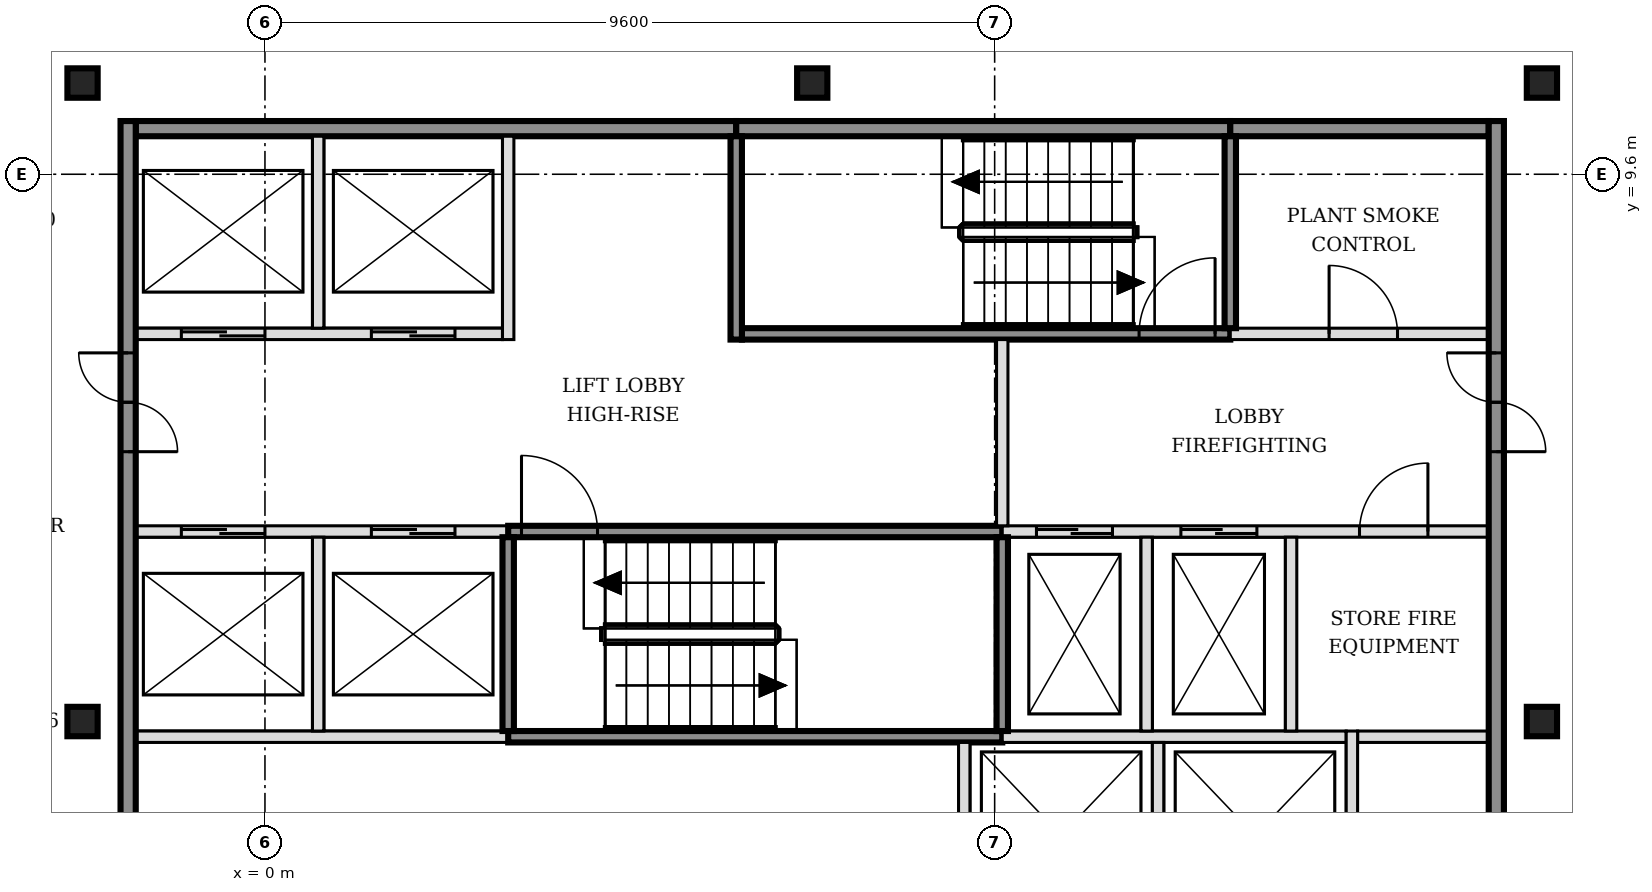
"""IFC4 building model, lengths in metres.
Left out: names, types, materials, properties, quantities, classifications, styles, units other than length and angle.
Written with IfcOpenShell. Run it as: python <this file> out.ifc"""

import sys

from ifc_helpers import new_model, si_unit, direction, frame, frame_2d, origin, origin_2d, place, context, subcontext, project, spatial, rectangle, i_section, extrude, element, fill, save


model = new_model("IFC4")
c1 = context("Model", 3, precision=1e-05, world=origin(), true_north=direction((0.0, 1.0)))
c2 = subcontext(c1, "Body", "Model", "MODEL_VIEW")
j1 = project(units=[si_unit("LENGTHUNIT", "METRE"), si_unit("PLANEANGLEUNIT", "RADIAN")], contexts=[c1])
p1 = place(None, origin())
s1 = spatial("IfcSite", under=j1, at=p1, CompositionType="ELEMENT")
p2 = place(p1, origin())
s2 = spatial("IfcBuilding", under=s1, at=p2, CompositionType="ELEMENT")
p3 = place(p2, frame((0.0, 0.0, 261.0)))
s3 = spatial("IfcBuildingStorey", under=s2, at=p3, CompositionType="ELEMENT", Elevation=261.0)
for number, where, z_axis, x_axis in (
    (1, (-2.4, 2.4, -0.25), (0.0, 0.0, 1.0), (1.0, 0.0, 0.0)),
    (2, (16.8, 2.4, -0.25), (0.0, 0.0, 1.0), (1.0, 0.0, 0.0)),
    (3, (-2.4, 10.8, -0.25), (0.0, 0.0, 1.0), (1.0, 0.0, 0.0)),
    (4, (7.2, 10.8, -0.25), (0.0, 0.0, 1.0), (1.0, 0.0, 0.0)),
    (5, (16.8, 10.8, -0.25), (0.0, 0.0, 1.0), (1.0, 0.0, 0.0)),
):
    element("IfcColumn", number, at=place(p3, frame(where, z_axis=z_axis, x_axis=x_axis)), inside=s3, PredefinedType="COLUMN", context=c2, shape_type="SweptSolid", body=[
        extrude(i_section(OverallWidth=0.398, OverallDepth=0.387, WebThickness=0.021, FlangeThickness=0.033, FilletRadius=0.015, at=origin_2d()), origin(), (0.0, 0.0, 1.0), 6.1),
    ])
p4 = place(p3, frame((-1.7, 2.2, 0.0), z_axis=(0.0, 0.0, 1.0), x_axis=(1.0, 0.0, 0.0)))
e6 = element("IfcWall", 6, at=p4, inside=s3, PredefinedType="SOLIDWALL", context=c2, shape_type="SweptSolid", body=[
    extrude(rectangle(XDim=4.9, YDim=0.15, at=frame_2d((2.45, 0.0))), origin(), (0.0, 0.0, 1.0), 5.85),
])
p5 = place(p3, frame((3.2, 2.2, 0.0), z_axis=(0.0, 0.0, 1.0), x_axis=(1.0, 0.0, 0.0)))
e7 = element("IfcWall", 7, at=p5, inside=s3, PredefinedType="SOLIDWALL", context=c2, shape_type="SweptSolid", body=[
    extrude(rectangle(XDim=6.5, YDim=0.15, at=frame_2d((3.25, 0.0))), origin(), (0.0, 0.0, 1.0), 5.85),
])
p6 = place(p3, frame((9.7, 2.2, 0.0), z_axis=(0.0, 0.0, 1.0), x_axis=(1.0, 0.0, 0.0)))
e8 = element("IfcWall", 8, at=p6, inside=s3, PredefinedType="SOLIDWALL", context=c2, shape_type="SweptSolid", body=[
    extrude(rectangle(XDim=4.525, YDim=0.15, at=frame_2d((2.263, 0.0))), origin(), (0.0, 0.0, 1.0), 5.85),
])
p7 = place(p3, frame((14.375, 2.2, 0.0), z_axis=(0.0, 0.0, 1.0), x_axis=(1.0, 0.0, 0.0)))
e9 = element("IfcWall", 9, at=p7, inside=s3, PredefinedType="PARTITIONING", context=c2, shape_type="SweptSolid", body=[
    extrude(rectangle(XDim=1.725, YDim=0.15, at=frame_2d((0.863, 0.0))), origin(), (0.0, 0.0, 1.0), 5.85),
])
p8 = place(p3, frame((-1.7, 4.9, 0.0), z_axis=(0.0, 0.0, 1.0), x_axis=(1.0, 0.0, 0.0)))
e10 = element("IfcWall", 10, at=p8, inside=s3, PredefinedType="SOLIDWALL", context=c2, shape_type="SweptSolid", body=[
    extrude(rectangle(XDim=4.9, YDim=0.15, at=frame_2d((2.45, 0.0))), origin(), (0.0, 0.0, 1.0), 5.85),
])
p9 = place(p8, frame((0.6, 0.0, 0.0)))
e11 = element("IfcOpeningElement", 11, at=p9, cuts=e10, PredefinedType="OPENING", context=c2, shape_type="SweptSolid", body=[
    extrude(rectangle(XDim=1.1, YDim=2.1, at=frame_2d((0.55, 1.05))), frame((0.0, 0.085, 0.0), z_axis=(0.0, -1.0, 0.0), x_axis=(1.0, 0.0, 0.0)), (0.0, 0.0, 1.0), 0.17),
])
p10 = place(p8, frame((3.1, 0.0, 0.0)))
e12 = element("IfcOpeningElement", 12, at=p10, cuts=e10, PredefinedType="OPENING", context=c2, shape_type="SweptSolid", body=[
    extrude(rectangle(XDim=1.1, YDim=2.1, at=frame_2d((0.55, 1.05))), frame((0.0, 0.085, 0.0), z_axis=(0.0, -1.0, 0.0), x_axis=(1.0, 0.0, 0.0)), (0.0, 0.0, 1.0), 0.17),
])
p11 = place(p3, frame((3.2, 4.9, 0.0), z_axis=(0.0, 0.0, 1.0), x_axis=(1.0, 0.0, 0.0)))
e13 = element("IfcWall", 13, at=p11, inside=s3, PredefinedType="SOLIDWALL", context=c2, shape_type="SweptSolid", body=[
    extrude(rectangle(XDim=6.5, YDim=0.15, at=frame_2d((3.25, 0.0))), origin(), (0.0, 0.0, 1.0), 5.85),
])
p12 = place(p11, frame((0.175, 0.0, 0.0)))
e14 = element("IfcOpeningElement", 14, at=p12, cuts=e13, PredefinedType="OPENING", context=c2, shape_type="SweptSolid", body=[
    extrude(rectangle(XDim=1.0, YDim=2.1, at=frame_2d((0.5, 1.05))), frame((0.0, 0.085, 0.0), z_axis=(0.0, -1.0, 0.0), x_axis=(1.0, 0.0, 0.0)), (0.0, 0.0, 1.0), 0.17),
])
p13 = place(p3, frame((9.7, 4.9, 0.0), z_axis=(0.0, 0.0, 1.0), x_axis=(1.0, 0.0, 0.0)))
e15 = element("IfcWall", 15, at=p13, inside=s3, PredefinedType="SOLIDWALL", context=c2, shape_type="SweptSolid", body=[
    extrude(rectangle(XDim=6.4, YDim=0.15, at=frame_2d((3.2, 0.0))), origin(), (0.0, 0.0, 1.0), 5.85),
])
p14 = place(p13, frame((0.45, 0.0, 0.0)))
e16 = element("IfcOpeningElement", 16, at=p14, cuts=e15, PredefinedType="OPENING", context=c2, shape_type="SweptSolid", body=[
    extrude(rectangle(XDim=1.0, YDim=2.1, at=frame_2d((0.5, 1.05))), frame((0.0, 0.085, 0.0), z_axis=(0.0, -1.0, 0.0), x_axis=(1.0, 0.0, 0.0)), (0.0, 0.0, 1.0), 0.17),
])
p15 = place(p13, frame((2.35, 0.0, 0.0)))
e17 = element("IfcOpeningElement", 17, at=p15, cuts=e15, PredefinedType="OPENING", context=c2, shape_type="SweptSolid", body=[
    extrude(rectangle(XDim=1.0, YDim=2.1, at=frame_2d((0.5, 1.05))), frame((0.0, 0.085, 0.0), z_axis=(0.0, -1.0, 0.0), x_axis=(1.0, 0.0, 0.0)), (0.0, 0.0, 1.0), 0.17),
])
p16 = place(p13, frame((4.7, 0.0, 0.0)))
e18 = element("IfcOpeningElement", 18, at=p16, cuts=e15, PredefinedType="OPENING", context=c2, shape_type="SweptSolid", body=[
    extrude(rectangle(XDim=0.9, YDim=2.1, at=frame_2d((0.45, 1.05))), frame((0.0, 0.085, 0.0), z_axis=(0.0, -1.0, 0.0), x_axis=(1.0, 0.0, 0.0)), (0.0, 0.0, 1.0), 0.17),
])
p17 = place(p3, frame((-1.7, 7.5, 0.0), z_axis=(0.0, 0.0, 1.0), x_axis=(1.0, 0.0, 0.0)))
e19 = element("IfcWall", 19, at=p17, inside=s3, PredefinedType="SOLIDWALL", context=c2, shape_type="SweptSolid", body=[
    extrude(rectangle(XDim=4.825, YDim=0.15, at=frame_2d((2.413, 0.0))), origin(), (0.0, 0.0, 1.0), 5.85),
])
p18 = place(p17, frame((0.6, 0.0, 0.0)))
e20 = element("IfcOpeningElement", 20, at=p18, cuts=e19, PredefinedType="OPENING", context=c2, shape_type="SweptSolid", body=[
    extrude(rectangle(XDim=1.1, YDim=2.1, at=frame_2d((0.55, 1.05))), frame((0.0, 0.085, 0.0), z_axis=(0.0, -1.0, 0.0), x_axis=(1.0, 0.0, 0.0)), (0.0, 0.0, 1.0), 0.17),
])
p19 = place(p17, frame((3.1, 0.0, 0.0)))
e21 = element("IfcOpeningElement", 21, at=p19, cuts=e19, PredefinedType="OPENING", context=c2, shape_type="SweptSolid", body=[
    extrude(rectangle(XDim=1.1, YDim=2.1, at=frame_2d((0.55, 1.05))), frame((0.0, 0.085, 0.0), z_axis=(0.0, -1.0, 0.0), x_axis=(1.0, 0.0, 0.0)), (0.0, 0.0, 1.0), 0.17),
])
p20 = place(p3, frame((6.275, 7.5, 0.0), z_axis=(0.0, 0.0, 1.0), x_axis=(1.0, 0.0, 0.0)))
e22 = element("IfcWall", 22, at=p20, inside=s3, PredefinedType="SOLIDWALL", context=c2, shape_type="SweptSolid", body=[
    extrude(rectangle(XDim=6.425, YDim=0.15, at=frame_2d((3.212, 0.0))), origin(), (0.0, 0.0, 1.0), 5.85),
])
p21 = place(p20, frame((5.225, 0.0, 0.0)))
e23 = element("IfcOpeningElement", 23, at=p21, cuts=e22, PredefinedType="OPENING", context=c2, shape_type="SweptSolid", body=[
    extrude(rectangle(XDim=1.0, YDim=2.1, at=frame_2d((0.5, 1.05))), frame((0.0, 0.085, 0.0), z_axis=(0.0, -1.0, 0.0), x_axis=(1.0, 0.0, 0.0)), (0.0, 0.0, 1.0), 0.17),
])
p22 = place(p3, frame((12.7, 7.5, 0.0), z_axis=(0.0, 0.0, 1.0), x_axis=(1.0, 0.0, 0.0)))
e24 = element("IfcWall", 24, at=p22, inside=s3, PredefinedType="SOLIDWALL", context=c2, shape_type="SweptSolid", body=[
    extrude(rectangle(XDim=3.4, YDim=0.15, at=frame_2d((1.7, 0.0))), origin(), (0.0, 0.0, 1.0), 5.85),
])
p23 = place(p22, frame((1.3, 0.0, 0.0)))
e25 = element("IfcOpeningElement", 25, at=p23, cuts=e24, PredefinedType="OPENING", context=c2, shape_type="SweptSolid", body=[
    extrude(rectangle(XDim=0.9, YDim=2.1, at=frame_2d((0.45, 1.05))), frame((0.0, 0.085, 0.0), z_axis=(0.0, -1.0, 0.0), x_axis=(1.0, 0.0, 0.0)), (0.0, 0.0, 1.0), 0.17),
])
p24 = place(p3, frame((-1.7, 10.2, 0.0), z_axis=(0.0, 0.0, 1.0), x_axis=(1.0, 0.0, 0.0)))
e26 = element("IfcWall", 26, at=p24, inside=s3, PredefinedType="SOLIDWALL", context=c2, shape_type="SweptSolid", body=[
    extrude(rectangle(XDim=7.9, YDim=0.2, at=frame_2d((3.95, 0.0))), origin(), (0.0, 0.0, 1.0), 5.85),
])
p25 = place(p3, frame((6.2, 10.2, 0.0), z_axis=(0.0, 0.0, 1.0), x_axis=(1.0, 0.0, 0.0)))
e27 = element("IfcWall", 27, at=p25, inside=s3, PredefinedType="SOLIDWALL", context=c2, shape_type="SweptSolid", body=[
    extrude(rectangle(XDim=6.5, YDim=0.2, at=frame_2d((3.25, 0.0))), origin(), (0.0, 0.0, 1.0), 5.85),
])
p26 = place(p3, frame((12.7, 10.2, 0.0), z_axis=(0.0, 0.0, 1.0), x_axis=(1.0, 0.0, 0.0)))
e28 = element("IfcWall", 28, at=p26, inside=s3, PredefinedType="SOLIDWALL", context=c2, shape_type="SweptSolid", body=[
    extrude(rectangle(XDim=3.4, YDim=0.2, at=frame_2d((1.7, 0.0))), origin(), (0.0, 0.0, 1.0), 5.85),
])
p27 = place(p3, frame((-1.8, -5.5, 0.0), z_axis=(0.0, 0.0, 1.0), x_axis=(0.0, 1.0, 0.0)))
e29 = element("IfcWall", 29, at=p27, inside=s3, PredefinedType="SOLIDWALL", context=c2, shape_type="SweptSolid", body=[
    extrude(rectangle(XDim=15.8, YDim=0.2, at=frame_2d((7.9, 0.0))), origin(), (0.0, 0.0, 1.0), 5.85),
])
p28 = place(p27, frame((3.05, 0.0, 0.0)))
e30 = element("IfcOpeningElement", 30, at=p28, cuts=e29, PredefinedType="OPENING", context=c2, shape_type="SweptSolid", body=[
    extrude(rectangle(XDim=1.3, YDim=2.1, at=frame_2d((0.65, 1.05))), frame((0.0, 0.11, 0.0), z_axis=(0.0, -1.0, 0.0), x_axis=(1.0, 0.0, 0.0)), (0.0, 0.0, 1.0), 0.22),
])
p29 = place(p27, frame((11.45, 0.0, 0.0)))
e31 = element("IfcOpeningElement", 31, at=p29, cuts=e29, PredefinedType="OPENING", context=c2, shape_type="SweptSolid", body=[
    extrude(rectangle(XDim=1.3, YDim=2.1, at=frame_2d((0.65, 1.05))), frame((0.0, 0.11, 0.0), z_axis=(0.0, -1.0, 0.0), x_axis=(1.0, 0.0, 0.0)), (0.0, 0.0, 1.0), 0.22),
])
p30 = place(p3, frame((0.7, 2.275, 0.0), z_axis=(0.0, 0.0, 1.0), x_axis=(0.0, 1.0, 0.0)))
e32 = element("IfcWall", 32, at=p30, inside=s3, PredefinedType="SOLIDWALL", context=c2, shape_type="SweptSolid", body=[
    extrude(rectangle(XDim=2.55, YDim=0.15, at=frame_2d((1.275, 0.0))), origin(), (0.0, 0.0, 1.0), 5.85),
])
p31 = place(p3, frame((0.7, 7.575, 0.0), z_axis=(0.0, 0.0, 1.0), x_axis=(0.0, 1.0, 0.0)))
e33 = element("IfcWall", 33, at=p31, inside=s3, PredefinedType="SOLIDWALL", context=c2, shape_type="SweptSolid", body=[
    extrude(rectangle(XDim=2.525, YDim=0.15, at=frame_2d((1.263, 0.0))), origin(), (0.0, 0.0, 1.0), 5.85),
])
p32 = place(p3, frame((3.2, 2.275, 0.0), z_axis=(0.0, 0.0, 1.0), x_axis=(0.0, 1.0, 0.0)))
e34 = element("IfcWall", 34, at=p32, inside=s3, PredefinedType="SOLIDWALL", context=c2, shape_type="SweptSolid", body=[
    extrude(rectangle(XDim=2.55, YDim=0.15, at=frame_2d((1.275, 0.0))), origin(), (0.0, 0.0, 1.0), 5.85),
])
for number, where, z_axis, x_axis in (
    (35, (3.2, 7.425, 0.0), (0.0, 0.0, 1.0), (0.0, 1.0, 0.0)),
    (36, (6.2, 7.425, 0.0), (0.0, 0.0, 1.0), (0.0, 1.0, 0.0)),
):
    element("IfcWall", number, at=place(p3, frame(where, z_axis=z_axis, x_axis=x_axis)), inside=s3, PredefinedType="SOLIDWALL", context=c2, shape_type="SweptSolid", body=[
        extrude(rectangle(XDim=2.675, YDim=0.15, at=frame_2d((1.337, 0.0))), origin(), (0.0, 0.0, 1.0), 5.85),
    ])
p33 = place(p3, frame((9.2, -0.475, 0.0), z_axis=(0.0, 0.0, 1.0), x_axis=(0.0, 1.0, 0.0)))
e37 = element("IfcWall", 37, at=p33, inside=s3, PredefinedType="SOLIDWALL", context=c2, shape_type="SweptSolid", body=[
    extrude(rectangle(XDim=2.6, YDim=0.15, at=frame_2d((1.3, 0.0))), origin(), (0.0, 0.0, 1.0), 5.85),
])
p34 = place(p3, frame((9.7, 2.275, 0.0), z_axis=(0.0, 0.0, 1.0), x_axis=(0.0, 1.0, 0.0)))
e38 = element("IfcWall", 38, at=p34, inside=s3, PredefinedType="SOLIDWALL", context=c2, shape_type="SweptSolid", body=[
    extrude(rectangle(XDim=2.55, YDim=0.15, at=frame_2d((1.275, 0.0))), origin(), (0.0, 0.0, 1.0), 5.85),
])
p35 = place(p3, frame((9.7, 4.975, 0.0), z_axis=(0.0, 0.0, 1.0), x_axis=(0.0, 1.0, 0.0)))
e39 = element("IfcWall", 39, at=p35, inside=s3, PredefinedType="SOLIDWALL", context=c2, shape_type="SweptSolid", body=[
    extrude(rectangle(XDim=2.45, YDim=0.15, at=frame_2d((1.225, 0.0))), origin(), (0.0, 0.0, 1.0), 5.85),
])
p36 = place(p3, frame((11.6, 2.275, 0.0), z_axis=(0.0, 0.0, 1.0), x_axis=(0.0, 1.0, 0.0)))
e40 = element("IfcWall", 40, at=p36, inside=s3, PredefinedType="SOLIDWALL", context=c2, shape_type="SweptSolid", body=[
    extrude(rectangle(XDim=2.55, YDim=0.15, at=frame_2d((1.275, 0.0))), origin(), (0.0, 0.0, 1.0), 5.85),
])
p37 = place(p3, frame((11.75, -0.325, 0.0), z_axis=(0.0, 0.0, 1.0), x_axis=(0.0, 1.0, 0.0)))
e41 = element("IfcWall", 41, at=p37, inside=s3, PredefinedType="SOLIDWALL", context=c2, shape_type="SweptSolid", body=[
    extrude(rectangle(XDim=2.45, YDim=0.15, at=frame_2d((1.225, 0.0))), origin(), (0.0, 0.0, 1.0), 5.85),
])
p38 = place(p3, frame((12.7, 7.575, 0.0), z_axis=(0.0, 0.0, 1.0), x_axis=(0.0, 1.0, 0.0)))
e42 = element("IfcWall", 42, at=p38, inside=s3, PredefinedType="SOLIDWALL", context=c2, shape_type="SweptSolid", body=[
    extrude(rectangle(XDim=2.525, YDim=0.15, at=frame_2d((1.263, 0.0))), origin(), (0.0, 0.0, 1.0), 5.85),
])
p39 = place(p3, frame((13.5, 2.275, 0.0), z_axis=(0.0, 0.0, 1.0), x_axis=(0.0, 1.0, 0.0)))
e43 = element("IfcWall", 43, at=p39, inside=s3, PredefinedType="SOLIDWALL", context=c2, shape_type="SweptSolid", body=[
    extrude(rectangle(XDim=2.55, YDim=0.15, at=frame_2d((1.275, 0.0))), origin(), (0.0, 0.0, 1.0), 5.85),
])
p40 = place(p3, frame((14.3, -0.475, 0.0), z_axis=(0.0, 0.0, 1.0), x_axis=(0.0, 1.0, 0.0)))
e44 = element("IfcWall", 44, at=p40, inside=s3, PredefinedType="SOLIDWALL", context=c2, shape_type="SweptSolid", body=[
    extrude(rectangle(XDim=2.75, YDim=0.15, at=frame_2d((1.375, 0.0))), origin(), (0.0, 0.0, 1.0), 5.85),
])
p41 = place(p3, frame((16.2, -5.5, 0.0), z_axis=(0.0, 0.0, 1.0), x_axis=(0.0, 1.0, 0.0)))
e45 = element("IfcWall", 45, at=p41, inside=s3, PredefinedType="SOLIDWALL", context=c2, shape_type="SweptSolid", body=[
    extrude(rectangle(XDim=15.8, YDim=0.2, at=frame_2d((7.9, 0.0))), origin(), (0.0, 0.0, 1.0), 5.85),
])
p42 = place(p41, frame((3.05, 0.0, 0.0)))
e46 = element("IfcOpeningElement", 46, at=p42, cuts=e45, PredefinedType="OPENING", context=c2, shape_type="SweptSolid", body=[
    extrude(rectangle(XDim=1.3, YDim=2.1, at=frame_2d((0.65, 1.05))), frame((0.0, 0.11, 0.0), z_axis=(0.0, -1.0, 0.0), x_axis=(1.0, 0.0, 0.0)), (0.0, 0.0, 1.0), 0.22),
])
p43 = place(p41, frame((11.45, 0.0, 0.0)))
e47 = element("IfcOpeningElement", 47, at=p43, cuts=e45, PredefinedType="OPENING", context=c2, shape_type="SweptSolid", body=[
    extrude(rectangle(XDim=1.3, YDim=2.1, at=frame_2d((0.65, 1.05))), frame((0.0, 0.11, 0.0), z_axis=(0.0, -1.0, 0.0), x_axis=(1.0, 0.0, 0.0)), (0.0, 0.0, 1.0), 0.22),
])
p44 = place(p9, origin())
e48 = element("IfcDoor", 48, at=p44, inside=s3, OperationType="DOUBLE_DOOR_SLIDING", PredefinedType="DOOR", context=c2, shape_type="SweptSolid", body=[
    extrude(rectangle(XDim=1.1, YDim=2.1, at=frame_2d((0.55, 1.05))), frame((0.0, 0.025, 0.0), z_axis=(0.0, -1.0, 0.0), x_axis=(1.0, 0.0, 0.0)), (0.0, 0.0, 1.0), 0.05),
])
fill(e11, e48)
p45 = place(p10, origin())
e49 = element("IfcDoor", 49, at=p45, inside=s3, OperationType="DOUBLE_DOOR_SLIDING", PredefinedType="DOOR", context=c2, shape_type="SweptSolid", body=[
    extrude(rectangle(XDim=1.1, YDim=2.1, at=frame_2d((0.55, 1.05))), frame((0.0, 0.025, 0.0), z_axis=(0.0, -1.0, 0.0), x_axis=(1.0, 0.0, 0.0)), (0.0, 0.0, 1.0), 0.05),
])
fill(e12, e49)
p46 = place(p18, origin())
e50 = element("IfcDoor", 50, at=p46, inside=s3, OperationType="DOUBLE_DOOR_SLIDING", PredefinedType="DOOR", context=c2, shape_type="SweptSolid", body=[
    extrude(rectangle(XDim=1.1, YDim=2.1, at=frame_2d((0.55, 1.05))), frame((0.0, 0.025, 0.0), z_axis=(0.0, -1.0, 0.0), x_axis=(1.0, 0.0, 0.0)), (0.0, 0.0, 1.0), 0.05),
])
fill(e20, e50)
p47 = place(p19, origin())
e51 = element("IfcDoor", 51, at=p47, inside=s3, OperationType="DOUBLE_DOOR_SLIDING", PredefinedType="DOOR", context=c2, shape_type="SweptSolid", body=[
    extrude(rectangle(XDim=1.1, YDim=2.1, at=frame_2d((0.55, 1.05))), frame((0.0, 0.025, 0.0), z_axis=(0.0, -1.0, 0.0), x_axis=(1.0, 0.0, 0.0)), (0.0, 0.0, 1.0), 0.05),
])
fill(e21, e51)
p48 = place(p14, origin())
e52 = element("IfcDoor", 52, at=p48, inside=s3, OperationType="DOUBLE_DOOR_SLIDING", PredefinedType="DOOR", context=c2, shape_type="SweptSolid", body=[
    extrude(rectangle(XDim=1.0, YDim=2.1, at=frame_2d((0.5, 1.05))), frame((0.0, 0.025, 0.0), z_axis=(0.0, -1.0, 0.0), x_axis=(1.0, 0.0, 0.0)), (0.0, 0.0, 1.0), 0.05),
])
fill(e16, e52)
p49 = place(p15, origin())
e53 = element("IfcDoor", 53, at=p49, inside=s3, OperationType="DOUBLE_DOOR_SLIDING", PredefinedType="DOOR", context=c2, shape_type="SweptSolid", body=[
    extrude(rectangle(XDim=1.0, YDim=2.1, at=frame_2d((0.5, 1.05))), frame((0.0, 0.025, 0.0), z_axis=(0.0, -1.0, 0.0), x_axis=(1.0, 0.0, 0.0)), (0.0, 0.0, 1.0), 0.05),
])
fill(e17, e53)
p50 = place(p12, origin())
e54 = element("IfcDoor", 54, at=p50, inside=s3, OperationType="SINGLE_SWING_LEFT", PredefinedType="DOOR", context=c2, shape_type="SweptSolid", body=[
    extrude(rectangle(XDim=1.0, YDim=2.1, at=frame_2d((0.5, 1.05))), frame((0.0, 0.025, 0.0), z_axis=(0.0, -1.0, 0.0), x_axis=(1.0, 0.0, 0.0)), (0.0, 0.0, 1.0), 0.05),
])
fill(e14, e54)
p51 = place(p21, origin())
e55 = element("IfcDoor", 55, at=p51, inside=s3, OperationType="SINGLE_SWING_RIGHT", PredefinedType="DOOR", context=c2, shape_type="SweptSolid", body=[
    extrude(rectangle(XDim=1.0, YDim=2.1, at=frame_2d((0.5, 1.05))), frame((0.0, 0.025, 0.0), z_axis=(0.0, -1.0, 0.0), x_axis=(1.0, 0.0, 0.0)), (0.0, 0.0, 1.0), 0.05),
])
fill(e23, e55)
p52 = place(p29, origin())
e56 = element("IfcDoor", 56, at=p52, inside=s3, OperationType="DOUBLE_DOOR_SINGLE_SWING", PredefinedType="DOOR", context=c2, shape_type="SweptSolid", body=[
    extrude(rectangle(XDim=1.3, YDim=2.1, at=frame_2d((0.65, 1.05))), frame((0.0, 0.025, 0.0), z_axis=(0.0, -1.0, 0.0), x_axis=(1.0, 0.0, 0.0)), (0.0, 0.0, 1.0), 0.05),
])
fill(e31, e56)
p53 = place(p43, origin())
e57 = element("IfcDoor", 57, at=p53, inside=s3, OperationType="DOUBLE_DOOR_SINGLE_SWING", PredefinedType="DOOR", context=c2, shape_type="SweptSolid", body=[
    extrude(rectangle(XDim=1.3, YDim=2.1, at=frame_2d((0.65, 1.05))), frame((0.0, 0.025, 0.0), z_axis=(0.0, -1.0, 0.0), x_axis=(1.0, 0.0, 0.0)), (0.0, 0.0, 1.0), 0.05),
])
fill(e47, e57)
p54 = place(p16, origin())
e58 = element("IfcDoor", 58, at=p54, inside=s3, OperationType="SINGLE_SWING_RIGHT", PredefinedType="DOOR", context=c2, shape_type="SweptSolid", body=[
    extrude(rectangle(XDim=0.9, YDim=2.1, at=frame_2d((0.45, 1.05))), frame((0.0, 0.025, 0.0), z_axis=(0.0, -1.0, 0.0), x_axis=(1.0, 0.0, 0.0)), (0.0, 0.0, 1.0), 0.05),
])
fill(e18, e58)
p55 = place(p23, origin())
e59 = element("IfcDoor", 59, at=p55, inside=s3, OperationType="SINGLE_SWING_LEFT", PredefinedType="DOOR", context=c2, shape_type="SweptSolid", body=[
    extrude(rectangle(XDim=0.9, YDim=2.1, at=frame_2d((0.45, 1.05))), frame((0.0, 0.025, 0.0), z_axis=(0.0, -1.0, 0.0), x_axis=(1.0, 0.0, 0.0)), (0.0, 0.0, 1.0), 0.05),
])
fill(e25, e59)
save(model, sys.argv[1])
